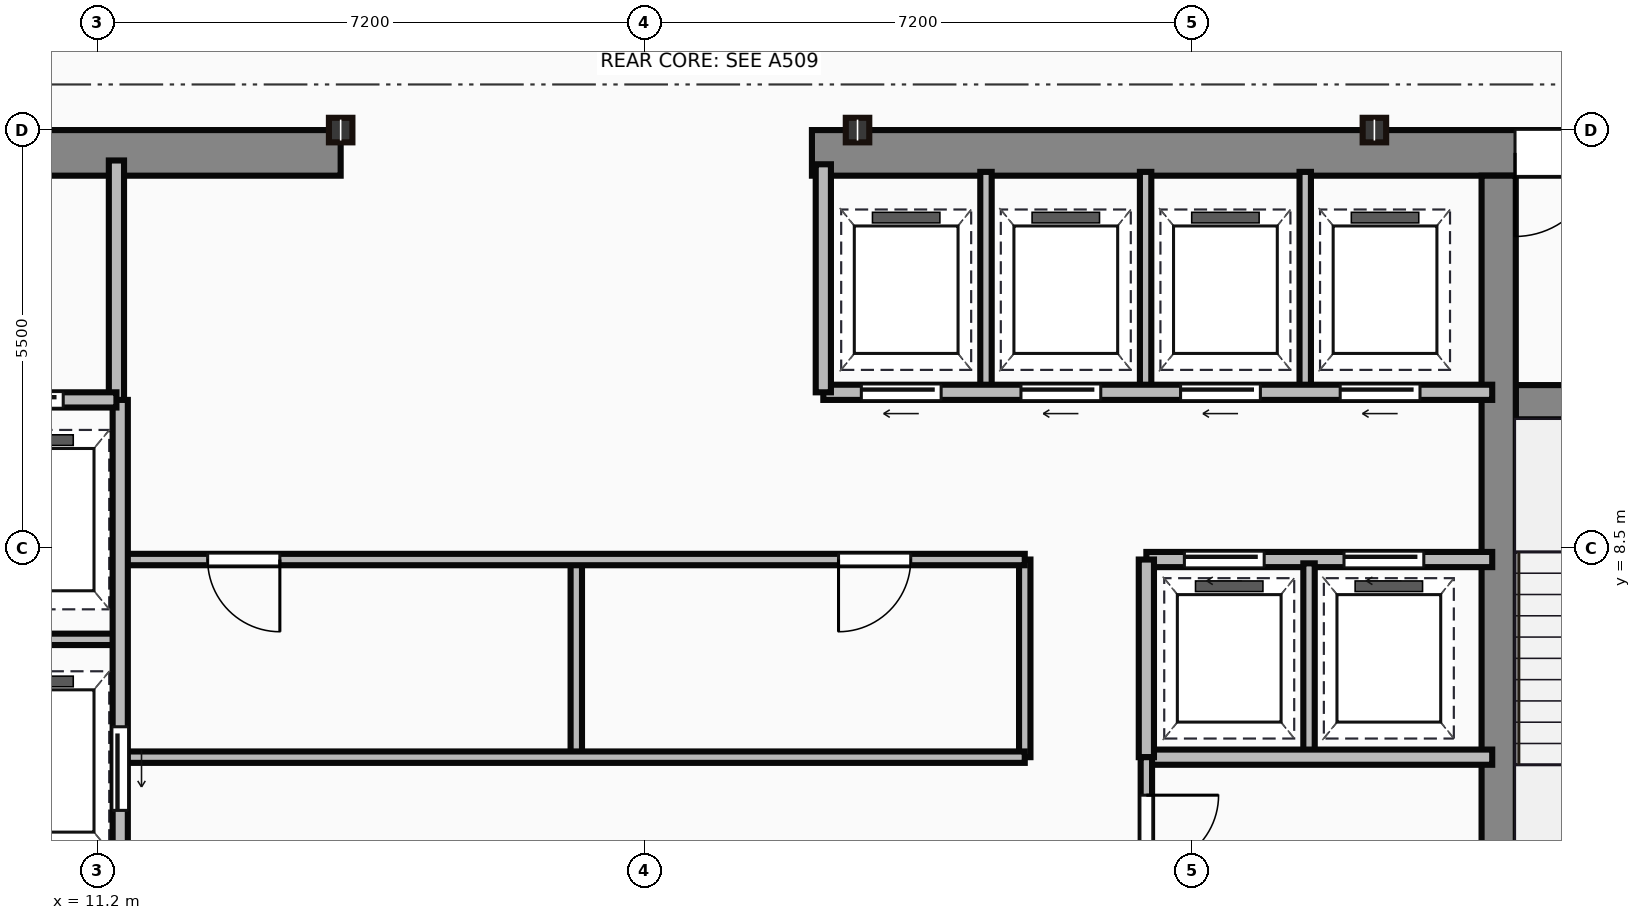
"""IFC4 building model, lengths in metres.
Left out: names, types, materials, properties, quantities, classifications, styles, units other than length and angle.
Written with IfcOpenShell. Run it as: python <this file> out.ifc"""

import sys

from ifc_helpers import new_model, si_unit, direction, frame, frame_2d, origin, origin_2d, place, context, subcontext, project, spatial, rectangle, i_section, extrude, source, transform, mapped, element, fill, save


model = new_model("IFC4")
c1 = context("Model", 3, precision=1e-05, world=origin(), true_north=direction((0.0, 1.0)))
c2 = subcontext(c1, "Body", "Model", "MODEL_VIEW")
j1 = project(units=[si_unit("LENGTHUNIT", "METRE"), si_unit("PLANEANGLEUNIT", "RADIAN")], contexts=[c1])
p1 = place(None, origin())
s1 = spatial("IfcSite", under=j1, at=p1, CompositionType="ELEMENT")
p2 = place(p1, origin())
s2 = spatial("IfcBuilding", under=s1, at=p2, CompositionType="ELEMENT")
p3 = place(p2, frame((0.0, 0.0, 217.8)))
s3 = spatial("IfcBuildingStorey", under=s2, at=p3, CompositionType="ELEMENT", Elevation=217.8)
m1 = source(origin(), c2, "Body", "SweptSolid", [
    extrude(rectangle(XDim=9.1, YDim=0.6, at=frame_2d((4.55, 0.0))), origin(), (0.0, 0.0, 1.0), 3.65),
])
p4 = place(p3, frame((5.3, 13.7, 0.0), z_axis=(0.0, 0.0, 1.0), x_axis=(1.0, 0.0, 0.0)))
e1 = element("IfcWall", 1, at=p4, inside=s3, PredefinedType="SHEAR", context=c2, shape_type="MappedRepresentation", body=[
    mapped(m1, transform((0.0, 0.0, 0.0))),
])
p5 = place(p4, frame((4.1, 0.0, 0.0)))
e2 = element("IfcOpeningElement", 2, at=p5, cuts=e1, PredefinedType="OPENING", context=c2, shape_type="SweptSolid", body=[
    extrude(rectangle(XDim=1.1, YDim=2.15, at=frame_2d((0.55, 1.075))), frame((0.0, 0.31, 0.0), z_axis=(0.0, -1.0, 0.0), x_axis=(1.0, 0.0, 0.0)), (0.0, 0.0, 1.0), 0.62),
])
m2 = source(origin(), c2, "Body", "SweptSolid", [
    extrude(rectangle(XDim=12.6, YDim=0.6, at=frame_2d((6.3, 0.0))), origin(), (0.0, 0.0, 1.0), 3.65),
])
p6 = place(p3, frame((20.6, 13.7, 0.0), z_axis=(0.0, 0.0, 1.0), x_axis=(1.0, 0.0, 0.0)))
e3 = element("IfcWall", 3, at=p6, inside=s3, PredefinedType="SHEAR", context=c2, shape_type="MappedRepresentation", body=[
    mapped(m2, transform((0.0, 0.0, 0.0))),
])
p7 = place(p6, frame((9.25, 0.0, 0.0)))
e4 = element("IfcOpeningElement", 4, at=p7, cuts=e3, PredefinedType="OPENING", context=c2, shape_type="SweptSolid", body=[
    extrude(rectangle(XDim=1.1, YDim=2.15, at=frame_2d((0.55, 1.075))), frame((0.0, 0.31, 0.0), z_axis=(0.0, -1.0, 0.0), x_axis=(1.0, 0.0, 0.0)), (0.0, 0.0, 1.0), 0.62),
])
m3 = source(origin(), c2, "Body", "SweptSolid", [
    extrude(rectangle(XDim=12.5, YDim=0.45, at=frame_2d((6.25, 0.0))), origin(), (0.0, 0.0, 1.0), 3.65),
])
p8 = place(p3, frame((29.635, 0.9, 0.0), z_axis=(0.0, 0.0, 1.0), x_axis=(0.0, 1.0, 0.0)))
e5 = element("IfcWall", 5, at=p8, inside=s3, PredefinedType="SHEAR", context=c2, shape_type="MappedRepresentation", body=[
    mapped(m3, transform((0.0, 0.0, 0.0))),
])
m4 = source(origin(), c2, "Body", "SweptSolid", [
    extrude(rectangle(XDim=3.39, YDim=0.45, at=frame_2d((1.695, 0.0))), origin(), (0.0, 0.0, 1.0), 3.65),
])
p9 = place(p3, frame((29.86, 10.42, 0.0), z_axis=(0.0, 0.0, 1.0), x_axis=(1.0, 0.0, 0.0)))
e6 = element("IfcWall", 6, at=p9, inside=s3, PredefinedType="SHEAR", context=c2, shape_type="MappedRepresentation", body=[
    mapped(m4, transform((0.0, 0.0, 0.0))),
])
p10 = place(p9, frame((1.1, 0.0, 0.0)))
e7 = element("IfcOpeningElement", 7, at=p10, cuts=e6, PredefinedType="OPENING", context=c2, shape_type="SweptSolid", body=[
    extrude(rectangle(XDim=1.1, YDim=2.15, at=frame_2d((0.55, 1.075))), frame((0.0, 0.235, 0.0), z_axis=(0.0, -1.0, 0.0), x_axis=(1.0, 0.0, 0.0)), (0.0, 0.0, 1.0), 0.47),
])
m5 = source(origin(), c2, "Body", "SweptSolid", [
    extrude(i_section(OverallWidth=0.309, OverallDepth=0.323, WebThickness=0.014, FlangeThickness=0.023, at=origin_2d()), origin(), (0.0, 0.0, 1.0), 3.65),
])
for number, where, z_axis, x_axis in (
    (8, (14.4, 14.0, 0.0), (0.0, 0.0, 1.0), (1.0, 0.0, 0.0)),
    (9, (21.2, 14.0, 0.0), (0.0, 0.0, 1.0), (1.0, 0.0, 0.0)),
    (10, (28.0, 14.0, 0.0), (0.0, 0.0, 1.0), (1.0, 0.0, 0.0)),
):
    element("IfcColumn", number, at=place(p3, frame(where, z_axis=z_axis, x_axis=x_axis)), inside=s3, PredefinedType="COLUMN", context=c2, shape_type="MappedRepresentation", body=[
        mapped(m5, transform((0.0, 0.0, 0.0))),
    ])
m6 = source(origin(), c2, "Body", "SweptSolid", [
    extrude(rectangle(XDim=3.18, YDim=0.2, at=frame_2d((1.59, 0.0))), origin(), (0.0, 0.0, 1.0), 3.4),
])
p11 = place(p3, frame((11.45, 10.42, 0.0), z_axis=(0.0, 0.0, 1.0), x_axis=(0.0, 1.0, 0.0)))
e11 = element("IfcWall", 11, at=p11, inside=s3, PredefinedType="PARTITIONING", context=c2, shape_type="MappedRepresentation", body=[
    mapped(m6, transform((0.0, 0.0, 0.0))),
])
m7 = source(origin(), c2, "Body", "SweptSolid", [
    extrude(rectangle(XDim=2.35, YDim=0.2, at=frame_2d((1.175, 0.0))), origin(), (0.0, 0.0, 1.0), 3.4),
])
p12 = place(p3, frame((9.1, 10.45, 0.0), z_axis=(0.0, 0.0, 1.0), x_axis=(1.0, 0.0, 0.0)))
e12 = element("IfcWall", 12, at=p12, inside=s3, PredefinedType="PARTITIONING", context=c2, shape_type="MappedRepresentation", body=[
    mapped(m7, transform((0.0, 0.0, 0.0))),
])
p13 = place(p12, frame((0.55, 0.0, 0.0)))
e13 = element("IfcOpeningElement", 13, at=p13, cuts=e12, PredefinedType="OPENING", context=c2, shape_type="SweptSolid", body=[
    extrude(rectangle(XDim=1.1, YDim=2.15, at=frame_2d((0.55, 1.075))), frame((0.0, 0.11, 0.0), z_axis=(0.0, -1.0, 0.0), x_axis=(1.0, 0.0, 0.0)), (0.0, 0.0, 1.0), 0.22),
])
m8 = source(origin(), c2, "Body", "SweptSolid", [
    extrude(rectangle(XDim=9.6, YDim=0.2, at=frame_2d((4.8, 0.0))), origin(), (0.0, 0.0, 1.0), 3.4),
])
p14 = place(p3, frame((11.5, 0.85, 0.0), z_axis=(0.0, 0.0, 1.0), x_axis=(0.0, 1.0, 0.0)))
e14 = element("IfcWall", 14, at=p14, inside=s3, PredefinedType="PARTITIONING", context=c2, shape_type="MappedRepresentation", body=[
    mapped(m8, transform((0.0, 0.0, 0.0))),
])
p15 = place(p14, frame((4.2, 0.0, 0.0)))
e15 = element("IfcOpeningElement", 15, at=p15, cuts=e14, PredefinedType="OPENING", context=c2, shape_type="SweptSolid", body=[
    extrude(rectangle(XDim=1.1, YDim=2.15, at=frame_2d((0.55, 1.075))), frame((0.0, 0.11, 0.0), z_axis=(0.0, -1.0, 0.0), x_axis=(1.0, 0.0, 0.0)), (0.0, 0.0, 1.0), 0.22),
])
p16 = place(p14, frame((0.9, 0.0, 0.0)))
e16 = element("IfcOpeningElement", 16, at=p16, cuts=e14, PredefinedType="OPENING", context=c2, shape_type="SweptSolid", body=[
    extrude(rectangle(XDim=1.2, YDim=2.15, at=frame_2d((0.6, 1.075))), frame((0.0, 0.11, 0.0), z_axis=(0.0, -1.0, 0.0), x_axis=(1.0, 0.0, 0.0)), (0.0, 0.0, 1.0), 0.22),
])
m9 = source(origin(), c2, "Body", "SweptSolid", [
    extrude(rectangle(XDim=2.4, YDim=0.15, at=frame_2d((1.2, 0.0))), origin(), (0.0, 0.0, 1.0), 3.4),
])
p17 = place(p3, frame((9.1, 7.3, 0.0), z_axis=(0.0, 0.0, 1.0), x_axis=(1.0, 0.0, 0.0)))
e17 = element("IfcWall", 17, at=p17, inside=s3, PredefinedType="PARTITIONING", context=c2, shape_type="MappedRepresentation", body=[
    mapped(m9, transform((0.0, 0.0, 0.0))),
])
m10 = source(origin(), c2, "Body", "SweptSolid", [
    extrude(rectangle(XDim=11.85, YDim=0.15, at=frame_2d((5.925, 0.0))), origin(), (0.0, 0.0, 1.0), 3.4),
])
p18 = place(p3, frame((11.55, 5.75, 0.0), z_axis=(0.0, 0.0, 1.0), x_axis=(1.0, 0.0, 0.0)))
e18 = element("IfcWall", 18, at=p18, inside=s3, PredefinedType="PARTITIONING", context=c2, shape_type="MappedRepresentation", body=[
    mapped(m10, transform((0.0, 0.0, 0.0))),
])
p19 = place(p3, frame((11.55, 8.35, 0.0), z_axis=(0.0, 0.0, 1.0), x_axis=(1.0, 0.0, 0.0)))
e19 = element("IfcWall", 19, at=p19, inside=s3, PredefinedType="PARTITIONING", context=c2, shape_type="MappedRepresentation", body=[
    mapped(m10, transform((0.0, 0.0, 0.0))),
])
p20 = place(p19, frame((1.1, 0.0, 0.0)))
e20 = element("IfcOpeningElement", 20, at=p20, cuts=e19, PredefinedType="OPENING", context=c2, shape_type="SweptSolid", body=[
    extrude(rectangle(XDim=0.95, YDim=2.15, at=frame_2d((0.475, 1.075))), frame((0.0, 0.085, 0.0), z_axis=(0.0, -1.0, 0.0), x_axis=(1.0, 0.0, 0.0)), (0.0, 0.0, 1.0), 0.17),
])
p21 = place(p19, frame((9.4, 0.0, 0.0)))
e21 = element("IfcOpeningElement", 21, at=p21, cuts=e19, PredefinedType="OPENING", context=c2, shape_type="SweptSolid", body=[
    extrude(rectangle(XDim=0.95, YDim=2.15, at=frame_2d((0.475, 1.075))), frame((0.0, 0.085, 0.0), z_axis=(0.0, -1.0, 0.0), x_axis=(1.0, 0.0, 0.0)), (0.0, 0.0, 1.0), 0.17),
])
m11 = source(origin(), c2, "Body", "SweptSolid", [
    extrude(rectangle(XDim=2.6, YDim=0.15, at=frame_2d((1.3, 0.0))), origin(), (0.0, 0.0, 1.0), 3.4),
])
p22 = place(p3, frame((23.4, 5.75, 0.0), z_axis=(0.0, 0.0, 1.0), x_axis=(0.0, 1.0, 0.0)))
e22 = element("IfcWall", 22, at=p22, inside=s3, PredefinedType="PARTITIONING", context=c2, shape_type="MappedRepresentation", body=[
    mapped(m11, transform((0.0, 0.0, 0.0))),
])
m12 = source(origin(), c2, "Body", "SweptSolid", [
    extrude(rectangle(XDim=2.5, YDim=0.15, at=frame_2d((1.25, 0.0))), origin(), (0.0, 0.0, 1.0), 3.4),
])
p23 = place(p3, frame((17.5, 5.8, 0.0), z_axis=(0.0, 0.0, 1.0), x_axis=(0.0, 1.0, 0.0)))
e23 = element("IfcWall", 23, at=p23, inside=s3, PredefinedType="PARTITIONING", context=c2, shape_type="MappedRepresentation", body=[
    mapped(m12, transform((0.0, 0.0, 0.0))),
])
m13 = source(origin(), c2, "Body", "SweptSolid", [
    extrude(rectangle(XDim=8.8, YDim=0.2, at=frame_2d((4.4, 0.0))), origin(), (0.0, 0.0, 1.0), 3.4),
])
p24 = place(p3, frame((20.75, 10.55, 0.0), z_axis=(0.0, 0.0, 1.0), x_axis=(1.0, 0.0, 0.0)))
e24 = element("IfcWall", 24, at=p24, inside=s3, PredefinedType="PARTITIONING", context=c2, shape_type="MappedRepresentation", body=[
    mapped(m13, transform((0.0, 0.0, 0.0))),
])
p25 = place(p24, frame((0.5, 0.0, 0.0)))
e25 = element("IfcOpeningElement", 25, at=p25, cuts=e24, PredefinedType="OPENING", context=c2, shape_type="SweptSolid", body=[
    extrude(rectangle(XDim=1.05, YDim=2.15, at=frame_2d((0.525, 1.075))), frame((0.0, 0.11, 0.0), z_axis=(0.0, -1.0, 0.0), x_axis=(1.0, 0.0, 0.0)), (0.0, 0.0, 1.0), 0.22),
])
p26 = place(p24, frame((2.6, 0.0, 0.0)))
e26 = element("IfcOpeningElement", 26, at=p26, cuts=e24, PredefinedType="OPENING", context=c2, shape_type="SweptSolid", body=[
    extrude(rectangle(XDim=1.05, YDim=2.15, at=frame_2d((0.525, 1.075))), frame((0.0, 0.11, 0.0), z_axis=(0.0, -1.0, 0.0), x_axis=(1.0, 0.0, 0.0)), (0.0, 0.0, 1.0), 0.22),
])
p27 = place(p24, frame((4.7, 0.0, 0.0)))
e27 = element("IfcOpeningElement", 27, at=p27, cuts=e24, PredefinedType="OPENING", context=c2, shape_type="SweptSolid", body=[
    extrude(rectangle(XDim=1.05, YDim=2.15, at=frame_2d((0.525, 1.075))), frame((0.0, 0.11, 0.0), z_axis=(0.0, -1.0, 0.0), x_axis=(1.0, 0.0, 0.0)), (0.0, 0.0, 1.0), 0.22),
])
p28 = place(p24, frame((6.8, 0.0, 0.0)))
e28 = element("IfcOpeningElement", 28, at=p28, cuts=e24, PredefinedType="OPENING", context=c2, shape_type="SweptSolid", body=[
    extrude(rectangle(XDim=1.05, YDim=2.15, at=frame_2d((0.525, 1.075))), frame((0.0, 0.11, 0.0), z_axis=(0.0, -1.0, 0.0), x_axis=(1.0, 0.0, 0.0)), (0.0, 0.0, 1.0), 0.22),
])
m14 = source(origin(), c2, "Body", "SweptSolid", [
    extrude(rectangle(XDim=3.0, YDim=0.2, at=frame_2d((1.5, 0.0))), origin(), (0.0, 0.0, 1.0), 3.4),
])
p29 = place(p3, frame((20.75, 10.55, 0.0), z_axis=(0.0, 0.0, 1.0), x_axis=(0.0, 1.0, 0.0)))
e29 = element("IfcWall", 29, at=p29, inside=s3, PredefinedType="PARTITIONING", context=c2, shape_type="MappedRepresentation", body=[
    mapped(m14, transform((0.0, 0.0, 0.0))),
])
m15 = source(origin(), c2, "Body", "SweptSolid", [
    extrude(rectangle(XDim=2.85, YDim=0.15, at=frame_2d((1.425, 0.0))), origin(), (0.0, 0.0, 1.0), 3.4),
])
for number, where, z_axis, x_axis in (
    (30, (22.89, 10.6, 0.0), (0.0, 0.0, 1.0), (0.0, 1.0, 0.0)),
    (31, (24.99, 10.6, 0.0), (0.0, 0.0, 1.0), (0.0, 1.0, 0.0)),
    (32, (27.09, 10.6, 0.0), (0.0, 0.0, 1.0), (0.0, 1.0, 0.0)),
):
    element("IfcWall", number, at=place(p3, frame(where, z_axis=z_axis, x_axis=x_axis)), inside=s3, PredefinedType="PARTITIONING", context=c2, shape_type="MappedRepresentation", body=[
        mapped(m15, transform((0.0, 0.0, 0.0))),
    ])
m16 = source(origin(), c2, "Body", "SweptSolid", [
    extrude(rectangle(XDim=4.55, YDim=0.2, at=frame_2d((2.275, 0.0))), origin(), (0.0, 0.0, 1.0), 3.4),
])
p30 = place(p3, frame((25.0, 8.35, 0.0), z_axis=(0.0, 0.0, 1.0), x_axis=(1.0, 0.0, 0.0)))
e33 = element("IfcWall", 33, at=p30, inside=s3, PredefinedType="PARTITIONING", context=c2, shape_type="MappedRepresentation", body=[
    mapped(m16, transform((0.0, 0.0, 0.0))),
])
p31 = place(p30, frame((0.5, 0.0, 0.0)))
e34 = element("IfcOpeningElement", 34, at=p31, cuts=e33, PredefinedType="OPENING", context=c2, shape_type="SweptSolid", body=[
    extrude(rectangle(XDim=1.05, YDim=2.15, at=frame_2d((0.525, 1.075))), frame((0.0, 0.11, 0.0), z_axis=(0.0, -1.0, 0.0), x_axis=(1.0, 0.0, 0.0)), (0.0, 0.0, 1.0), 0.22),
])
p32 = place(p30, frame((2.6, 0.0, 0.0)))
e35 = element("IfcOpeningElement", 35, at=p32, cuts=e33, PredefinedType="OPENING", context=c2, shape_type="SweptSolid", body=[
    extrude(rectangle(XDim=1.05, YDim=2.15, at=frame_2d((0.525, 1.075))), frame((0.0, 0.11, 0.0), z_axis=(0.0, -1.0, 0.0), x_axis=(1.0, 0.0, 0.0)), (0.0, 0.0, 1.0), 0.22),
])
p33 = place(p3, frame((25.0, 5.75, 0.0), z_axis=(0.0, 0.0, 1.0), x_axis=(1.0, 0.0, 0.0)))
e36 = element("IfcWall", 36, at=p33, inside=s3, PredefinedType="PARTITIONING", context=c2, shape_type="MappedRepresentation", body=[
    mapped(m16, transform((0.0, 0.0, 0.0))),
])
m17 = source(origin(), c2, "Body", "SweptSolid", [
    extrude(rectangle(XDim=2.6, YDim=0.2, at=frame_2d((1.3, 0.0))), origin(), (0.0, 0.0, 1.0), 3.4),
])
p34 = place(p3, frame((25.0, 5.75, 0.0), z_axis=(0.0, 0.0, 1.0), x_axis=(0.0, 1.0, 0.0)))
e37 = element("IfcWall", 37, at=p34, inside=s3, PredefinedType="PARTITIONING", context=c2, shape_type="MappedRepresentation", body=[
    mapped(m17, transform((0.0, 0.0, 0.0))),
])
p35 = place(p3, frame((27.14, 5.8, 0.0), z_axis=(0.0, 0.0, 1.0), x_axis=(0.0, 1.0, 0.0)))
e38 = element("IfcWall", 38, at=p35, inside=s3, PredefinedType="PARTITIONING", context=c2, shape_type="MappedRepresentation", body=[
    mapped(m12, transform((0.0, 0.0, 0.0))),
])
m18 = source(origin(), c2, "Body", "SweptSolid", [
    extrude(rectangle(XDim=4.9, YDim=0.15, at=frame_2d((2.45, 0.0))), origin(), (0.0, 0.0, 1.0), 3.4),
])
p36 = place(p3, frame((25.0, 0.85, 0.0), z_axis=(0.0, 0.0, 1.0), x_axis=(0.0, 1.0, 0.0)))
e39 = element("IfcWall", 39, at=p36, inside=s3, PredefinedType="PARTITIONING", context=c2, shape_type="MappedRepresentation", body=[
    mapped(m18, transform((0.0, 0.0, 0.0))),
])
p37 = place(p36, frame((1.8, 0.0, 0.0)))
e40 = element("IfcOpeningElement", 40, at=p37, cuts=e39, PredefinedType="OPENING", context=c2, shape_type="SweptSolid", body=[
    extrude(rectangle(XDim=0.95, YDim=2.15, at=frame_2d((0.475, 1.075))), frame((0.0, 0.085, 0.0), z_axis=(0.0, -1.0, 0.0), x_axis=(1.0, 0.0, 0.0)), (0.0, 0.0, 1.0), 0.17),
])
p38 = place(p36, frame((3.45, 0.0, 0.0)))
e41 = element("IfcOpeningElement", 41, at=p38, cuts=e39, PredefinedType="OPENING", context=c2, shape_type="SweptSolid", body=[
    extrude(rectangle(XDim=0.95, YDim=2.15, at=frame_2d((0.475, 1.075))), frame((0.0, 0.085, 0.0), z_axis=(0.0, -1.0, 0.0), x_axis=(1.0, 0.0, 0.0)), (0.0, 0.0, 1.0), 0.17),
])
m19 = source(origin(), c2, "Body", "SweptSolid", [
    extrude(rectangle(XDim=1.1, YDim=2.15, at=frame_2d((0.55, 1.075))), frame((0.0, 0.025, 0.0), z_axis=(0.0, -1.0, 0.0), x_axis=(1.0, 0.0, 0.0)), (0.0, 0.0, 1.0), 0.05),
])
p39 = place(p7, origin())
e42 = element("IfcDoor", 42, at=p39, inside=s3, OperationType="SINGLE_SWING_LEFT", PredefinedType="DOOR", context=c2, shape_type="MappedRepresentation", body=[
    mapped(m19, transform((0.0, 0.0, 0.0))),
])
fill(e4, e42)
p40 = place(p13, origin())
e43 = element("IfcDoor", 43, at=p40, inside=s3, OperationType="SLIDING_TO_LEFT", PredefinedType="DOOR", context=c2, shape_type="MappedRepresentation", body=[
    mapped(m19, transform((0.0, 0.0, 0.0))),
])
fill(e13, e43)
p41 = place(p15, frame((1.1, 0.0, 0.0), z_axis=(0.0, 0.0, 1.0), x_axis=(-1.0, 0.0, 0.0)))
e44 = element("IfcDoor", 44, at=p41, inside=s3, OperationType="SLIDING_TO_LEFT", PredefinedType="DOOR", context=c2, shape_type="MappedRepresentation", body=[
    mapped(m19, transform((0.0, 0.0, 0.0))),
])
fill(e15, e44)
m20 = source(origin(), c2, "Body", "SweptSolid", [
    extrude(rectangle(XDim=0.95, YDim=2.15, at=frame_2d((0.475, 1.075))), frame((0.0, 0.025, 0.0), z_axis=(0.0, -1.0, 0.0), x_axis=(1.0, 0.0, 0.0)), (0.0, 0.0, 1.0), 0.05),
])
p42 = place(p20, origin())
e45 = element("IfcDoor", 45, at=p42, inside=s3, OperationType="SINGLE_SWING_RIGHT", PredefinedType="DOOR", context=c2, shape_type="MappedRepresentation", body=[
    mapped(m20, transform((0.0, 0.0, 0.0))),
])
fill(e20, e45)
p43 = place(p21, origin())
e46 = element("IfcDoor", 46, at=p43, inside=s3, OperationType="SINGLE_SWING_LEFT", PredefinedType="DOOR", context=c2, shape_type="MappedRepresentation", body=[
    mapped(m20, transform((0.0, 0.0, 0.0))),
])
fill(e21, e46)
m21 = source(origin(), c2, "Body", "SweptSolid", [
    extrude(rectangle(XDim=1.05, YDim=2.15, at=frame_2d((0.525, 1.075))), frame((0.0, 0.025, 0.0), z_axis=(0.0, -1.0, 0.0), x_axis=(1.0, 0.0, 0.0)), (0.0, 0.0, 1.0), 0.05),
])
p44 = place(p25, frame((1.05, 0.0, 0.0), z_axis=(0.0, 0.0, 1.0), x_axis=(-1.0, 0.0, 0.0)))
e47 = element("IfcDoor", 47, at=p44, inside=s3, OperationType="SLIDING_TO_LEFT", PredefinedType="DOOR", context=c2, shape_type="MappedRepresentation", body=[
    mapped(m21, transform((0.0, 0.0, 0.0))),
])
fill(e25, e47)
p45 = place(p26, frame((1.05, 0.0, 0.0), z_axis=(0.0, 0.0, 1.0), x_axis=(-1.0, 0.0, 0.0)))
e48 = element("IfcDoor", 48, at=p45, inside=s3, OperationType="SLIDING_TO_LEFT", PredefinedType="DOOR", context=c2, shape_type="MappedRepresentation", body=[
    mapped(m21, transform((0.0, 0.0, 0.0))),
])
fill(e26, e48)
p46 = place(p27, frame((1.05, 0.0, 0.0), z_axis=(0.0, 0.0, 1.0), x_axis=(-1.0, 0.0, 0.0)))
e49 = element("IfcDoor", 49, at=p46, inside=s3, OperationType="SLIDING_TO_LEFT", PredefinedType="DOOR", context=c2, shape_type="MappedRepresentation", body=[
    mapped(m21, transform((0.0, 0.0, 0.0))),
])
fill(e27, e49)
p47 = place(p28, frame((1.05, 0.0, 0.0), z_axis=(0.0, 0.0, 1.0), x_axis=(-1.0, 0.0, 0.0)))
e50 = element("IfcDoor", 50, at=p47, inside=s3, OperationType="SLIDING_TO_LEFT", PredefinedType="DOOR", context=c2, shape_type="MappedRepresentation", body=[
    mapped(m21, transform((0.0, 0.0, 0.0))),
])
fill(e28, e50)
p48 = place(p31, origin())
e51 = element("IfcDoor", 51, at=p48, inside=s3, OperationType="SLIDING_TO_LEFT", PredefinedType="DOOR", context=c2, shape_type="MappedRepresentation", body=[
    mapped(m21, transform((0.0, 0.0, 0.0))),
])
fill(e34, e51)
p49 = place(p32, origin())
e52 = element("IfcDoor", 52, at=p49, inside=s3, OperationType="SLIDING_TO_LEFT", PredefinedType="DOOR", context=c2, shape_type="MappedRepresentation", body=[
    mapped(m21, transform((0.0, 0.0, 0.0))),
])
fill(e35, e52)
p50 = place(p38, origin())
e53 = element("IfcDoor", 53, at=p50, inside=s3, OperationType="SINGLE_SWING_RIGHT", PredefinedType="DOOR", context=c2, shape_type="MappedRepresentation", body=[
    mapped(m20, transform((0.0, 0.0, 0.0))),
])
fill(e41, e53)
save(model, sys.argv[1])
